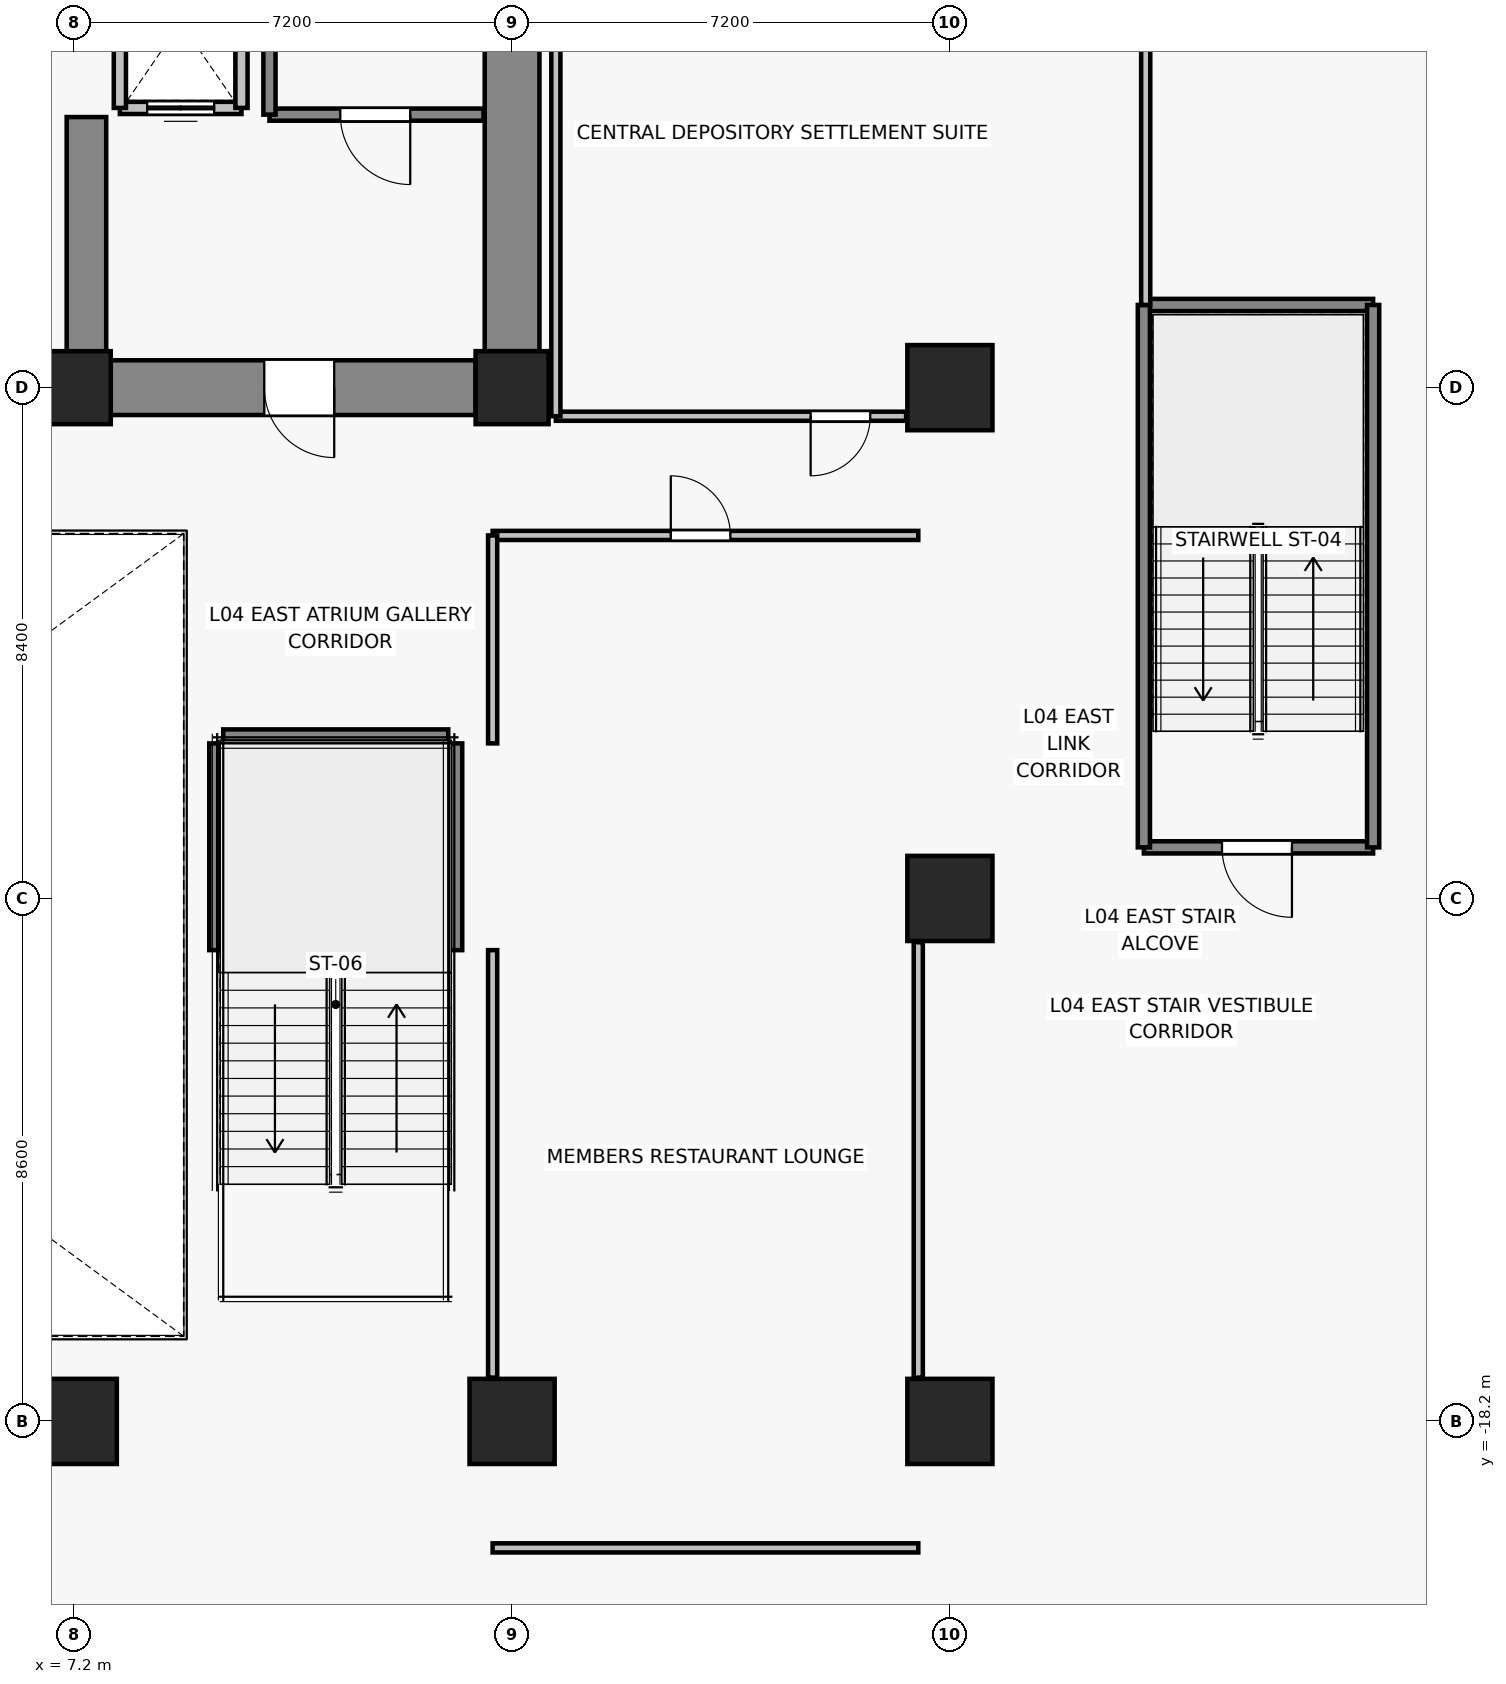
"""IFC4 building model, lengths in metres.
Left out: names, types, materials, properties, quantities, classifications, styles, units other than length and angle.
Written with IfcOpenShell. Run it as: python <this file> out.ifc"""

import sys

from ifc_helpers import new_model, si_unit, direction, frame, frame_2d, origin, origin_2d, place, context, subcontext, project, spatial, rectangle, extrude, source, transform, mapped, element, fill, save


model = new_model("IFC4")
c1 = context("Model", 3, precision=1e-05, world=origin(), true_north=direction((0.0, 1.0)))
c2 = subcontext(c1, "Body", "Model", "MODEL_VIEW")
j1 = project(units=[si_unit("LENGTHUNIT", "METRE"), si_unit("PLANEANGLEUNIT", "RADIAN")], contexts=[c1])
p1 = place(None, origin())
s1 = spatial("IfcSite", under=j1, at=p1, CompositionType="ELEMENT")
p2 = place(p1, origin())
s2 = spatial("IfcBuilding", under=s1, at=p2, CompositionType="ELEMENT")
p3 = place(p2, frame((0.0, 0.0, 18.2)))
s3 = spatial("IfcBuildingStorey", under=s2, at=p3, CompositionType="ELEMENT", Elevation=18.2)
for number, where, z_axis, x_axis in (
    (1, (7.2, -1.2, 0.0), (0.0, 0.0, 1.0), (1.0, 0.0, 0.0)),
    (2, (14.4, -1.2, 0.0), (0.0, 0.0, 1.0), (1.0, 0.0, 0.0)),
):
    element("IfcColumn", number, at=place(p3, frame(where, z_axis=z_axis, x_axis=x_axis)), inside=s3, PredefinedType="COLUMN", context=c2, shape_type="SweptSolid", body=[
        extrude(rectangle(XDim=1.2, YDim=1.2, at=origin_2d()), origin(), (0.0, 0.0, 1.0), 4.4),
    ])
for number, where, z_axis, x_axis in (
    (3, (7.2, -18.2, 0.0), (0.0, 0.0, 1.0), (1.0, 0.0, 0.0)),
    (4, (14.4, -18.2, 0.0), (0.0, 0.0, 1.0), (1.0, 0.0, 0.0)),
    (5, (21.6, -18.2, 0.0), (0.0, 0.0, 1.0), (1.0, 0.0, 0.0)),
    (6, (21.6, -9.6, 0.0), (0.0, 0.0, 1.0), (1.0, 0.0, 0.0)),
    (7, (21.6, -1.2, 0.0), (0.0, 0.0, 1.0), (1.0, 0.0, 0.0)),
):
    element("IfcColumn", number, at=place(p3, frame(where, z_axis=z_axis, x_axis=x_axis)), inside=s3, PredefinedType="COLUMN", context=c2, shape_type="SweptSolid", body=[
        extrude(rectangle(XDim=1.4, YDim=1.4, at=origin_2d()), origin(), (0.0, 0.0, 1.0), 4.4),
    ])
p4 = place(p3, frame((14.4, -0.6, 0.0), z_axis=(0.0, 0.0, 1.0), x_axis=(0.0, 1.0, 0.0)))
e8 = element("IfcWall", 8, at=p4, inside=s3, PredefinedType="SHEAR", context=c2, shape_type="SweptSolid", body=[
    extrude(rectangle(XDim=6.6, YDim=0.9, at=frame_2d((3.3, 0.0))), origin(), (0.0, 0.0, 1.0), 4.1),
])
p5 = place(p3, frame((13.8, -1.2, 0.0), z_axis=(0.0, 0.0, 1.0), x_axis=(-1.0, 0.0, 0.0)))
e9 = element("IfcWall", 9, at=p5, inside=s3, PredefinedType="SHEAR", context=c2, shape_type="SweptSolid", body=[
    extrude(rectangle(XDim=6.0, YDim=0.9, at=frame_2d((3.0, 0.0))), origin(), (0.0, 0.0, 1.0), 4.1),
])
p6 = place(p5, frame((2.325, 0.0, 0.0)))
e10 = element("IfcOpeningElement", 10, at=p6, cuts=e9, PredefinedType="OPENING", context=c2, shape_type="SweptSolid", body=[
    extrude(rectangle(XDim=1.15, YDim=2.15, at=frame_2d((0.575, 1.075))), frame((0.0, 0.46, 0.0), z_axis=(0.0, -1.0, 0.0), x_axis=(1.0, 0.0, 0.0)), (0.0, 0.0, 1.0), 0.92),
])
p7 = place(p3, frame((7.4, -0.75, 0.0), z_axis=(0.0, 0.0, 1.0), x_axis=(0.0, 1.0, 0.0)))
e11 = element("IfcWall", 11, at=p7, inside=s3, PredefinedType="SHEAR", context=c2, shape_type="SweptSolid", body=[
    extrude(rectangle(XDim=4.0, YDim=0.65, at=frame_2d((2.0, 0.0))), origin(), (0.0, 0.0, 1.0), 4.1),
])
for number, where, z_axis, x_axis in (
    (12, (9.52, -10.45, 0.0), (0.0, 0.0, 1.0), (0.0, 1.0, 0.0)),
    (13, (13.48, -7.05, 0.0), (0.0, 0.0, 1.0), (0.0, -1.0, 0.0)),
):
    element("IfcWall", number, at=place(p3, frame(where, z_axis=z_axis, x_axis=x_axis)), inside=s3, PredefinedType="SOLIDWALL", context=c2, shape_type="SweptSolid", body=[
        extrude(rectangle(XDim=3.4, YDim=0.2, at=frame_2d((1.7, 0.0))), origin(), (0.0, 0.0, 1.0), 4.1),
    ])
p8 = place(p3, frame((9.65, -6.92, 0.0), z_axis=(0.0, 0.0, 1.0), x_axis=(1.0, 0.0, 0.0)))
e14 = element("IfcWall", 14, at=p8, inside=s3, PredefinedType="SOLIDWALL", context=c2, shape_type="SweptSolid", body=[
    extrude(rectangle(XDim=3.7, YDim=0.2, at=frame_2d((1.85, 0.0))), origin(), (0.0, 0.0, 1.0), 4.1),
])
p9 = place(p3, frame((9.95, 3.4, 0.0), z_axis=(0.0, 0.0, 1.0), x_axis=(-1.0, 0.0, 0.0)))
e15 = element("IfcWall", 15, at=p9, inside=s3, PredefinedType="SOLIDWALL", context=c2, shape_type="SweptSolid", body=[
    extrude(rectangle(XDim=2.0, YDim=0.2, at=frame_2d((1.0, 0.0))), origin(), (0.0, 0.0, 1.0), 4.1),
])
p10 = place(p9, frame((0.45, 0.0, 0.0)))
e16 = element("IfcOpeningElement", 16, at=p10, cuts=e15, PredefinedType="OPENING", context=c2, shape_type="SweptSolid", body=[
    extrude(rectangle(XDim=1.1, YDim=2.2, at=frame_2d((0.55, 1.1))), frame((0.0, 0.11, 0.0), z_axis=(0.0, -1.0, 0.0), x_axis=(1.0, 0.0, 0.0)), (0.0, 0.0, 1.0), 0.22),
])
for number, where, z_axis, x_axis in (
    (17, (7.95, 3.4, 0.0), (0.0, 0.0, 1.0), (0.0, 1.0, 0.0)),
    (18, (9.95, 6.2, 0.0), (0.0, 0.0, 1.0), (0.0, -1.0, 0.0)),
):
    element("IfcWall", number, at=place(p3, frame(where, z_axis=z_axis, x_axis=x_axis)), inside=s3, PredefinedType="SOLIDWALL", context=c2, shape_type="SweptSolid", body=[
        extrude(rectangle(XDim=2.8, YDim=0.2, at=frame_2d((1.4, 0.0))), origin(), (0.0, 0.0, 1.0), 4.1),
    ])
p11 = place(p3, frame((13.93, 3.29, 0.0), z_axis=(0.0, 0.0, 1.0), x_axis=(-1.0, 0.0, 0.0)))
e19 = element("IfcWall", 19, at=p11, inside=s3, PredefinedType="SOLIDWALL", context=c2, shape_type="SweptSolid", body=[
    extrude(rectangle(XDim=3.52, YDim=0.2, at=frame_2d((1.76, 0.0))), origin(), (0.0, 0.0, 1.0), 4.1),
])
p12 = place(p11, frame((1.205, 0.0, 0.0)))
e20 = element("IfcOpeningElement", 20, at=p12, cuts=e19, PredefinedType="OPENING", context=c2, shape_type="SweptSolid", body=[
    extrude(rectangle(XDim=1.15, YDim=2.15, at=frame_2d((0.575, 1.075))), frame((0.0, 0.11, 0.0), z_axis=(0.0, -1.0, 0.0), x_axis=(1.0, 0.0, 0.0)), (0.0, 0.0, 1.0), 0.22),
])
p13 = place(p3, frame((10.41, 3.29, 0.0), z_axis=(0.0, 0.0, 1.0), x_axis=(0.0, 1.0, 0.0)))
e21 = element("IfcWall", 21, at=p13, inside=s3, PredefinedType="SOLIDWALL", context=c2, shape_type="SweptSolid", body=[
    extrude(rectangle(XDim=8.84, YDim=0.2, at=frame_2d((4.42, 0.0))), origin(), (0.0, 0.0, 1.0), 4.1),
])
p14 = place(p3, frame((28.56, -8.76, 0.0), z_axis=(0.0, 0.0, 1.0), x_axis=(-1.0, 0.0, 0.0)))
e22 = element("IfcWall", 22, at=p14, inside=s3, PredefinedType="SOLIDWALL", context=c2, shape_type="SweptSolid", body=[
    extrude(rectangle(XDim=3.77, YDim=0.2, at=frame_2d((1.885, 0.0))), origin(), (0.0, 0.0, 1.0), 4.1),
])
p15 = place(p14, frame((1.335, 0.0, 0.0)))
e23 = element("IfcOpeningElement", 23, at=p15, cuts=e22, PredefinedType="OPENING", context=c2, shape_type="SweptSolid", body=[
    extrude(rectangle(XDim=1.15, YDim=2.15, at=frame_2d((0.575, 1.075))), frame((0.0, 0.11, 0.0), z_axis=(0.0, -1.0, 0.0), x_axis=(1.0, 0.0, 0.0)), (0.0, 0.0, 1.0), 0.22),
])
p16 = place(p3, frame((24.79, 0.16, 0.0), z_axis=(0.0, 0.0, 1.0), x_axis=(1.0, 0.0, 0.0)))
e24 = element("IfcWall", 24, at=p16, inside=s3, PredefinedType="SOLIDWALL", context=c2, shape_type="SweptSolid", body=[
    extrude(rectangle(XDim=3.77, YDim=0.2, at=frame_2d((1.885, 0.0))), origin(), (0.0, 0.0, 1.0), 4.1),
])
for number, where, z_axis, x_axis in (
    (25, (24.79, -8.76, 0.0), (0.0, 0.0, 1.0), (0.0, 1.0, 0.0)),
    (26, (28.56, 0.16, 0.0), (0.0, 0.0, 1.0), (0.0, -1.0, 0.0)),
):
    element("IfcWall", number, at=place(p3, frame(where, z_axis=z_axis, x_axis=x_axis)), inside=s3, PredefinedType="SOLIDWALL", context=c2, shape_type="SweptSolid", body=[
        extrude(rectangle(XDim=8.92, YDim=0.2, at=frame_2d((4.46, 0.0))), origin(), (0.0, 0.0, 1.0), 4.1),
    ])
p17 = place(p3, frame((21.08, -20.28, 0.0), z_axis=(0.0, 0.0, 1.0), x_axis=(-1.0, 0.0, 0.0)))
e27 = element("IfcWall", 27, at=p17, inside=s3, PredefinedType="PARTITIONING", context=c2, shape_type="SweptSolid", body=[
    extrude(rectangle(XDim=7.0, YDim=0.15, at=frame_2d((3.5, 0.0))), origin(), (0.0, 0.0, 1.0), 4.1),
])
p18 = place(p3, frame((14.08, -3.63, 0.0), z_axis=(0.0, 0.0, 1.0), x_axis=(1.0, 0.0, 0.0)))
e28 = element("IfcWall", 28, at=p18, inside=s3, PredefinedType="PARTITIONING", context=c2, shape_type="SweptSolid", body=[
    extrude(rectangle(XDim=7.0, YDim=0.15, at=frame_2d((3.5, 0.0))), origin(), (0.0, 0.0, 1.0), 3.239),
])
p19 = place(p18, frame((2.93, 0.0, 0.0)))
e29 = element("IfcOpeningElement", 29, at=p19, cuts=e28, PredefinedType="OPENING", context=c2, shape_type="SweptSolid", body=[
    extrude(rectangle(XDim=0.98, YDim=2.15, at=frame_2d((0.49, 1.075))), frame((0.0, 0.085, 0.0), z_axis=(0.0, -1.0, 0.0), x_axis=(1.0, 0.0, 0.0)), (0.0, 0.0, 1.0), 0.17),
])
p20 = place(p3, frame((14.08, -17.48, 0.0), z_axis=(0.0, 0.0, 1.0), x_axis=(0.0, 1.0, 0.0)))
e30 = element("IfcWall", 30, at=p20, inside=s3, PredefinedType="PARTITIONING", context=c2, shape_type="SweptSolid", body=[
    extrude(rectangle(XDim=7.03, YDim=0.15, at=frame_2d((3.515, 0.0))), origin(), (0.0, 0.0, 1.0), 3.29),
])
p21 = place(p3, frame((14.08, -7.05, 0.0), z_axis=(0.0, 0.0, 1.0), x_axis=(0.0, 1.0, 0.0)))
e31 = element("IfcWall", 31, at=p21, inside=s3, PredefinedType="PARTITIONING", context=c2, shape_type="SweptSolid", body=[
    extrude(rectangle(XDim=3.42, YDim=0.15, at=frame_2d((1.71, 0.0))), origin(), (0.0, 0.0, 1.0), 3.29),
])
p22 = place(p3, frame((21.08, -10.32, 0.0), z_axis=(0.0, 0.0, 1.0), x_axis=(0.0, -1.0, 0.0)))
e32 = element("IfcWall", 32, at=p22, inside=s3, PredefinedType="PARTITIONING", context=c2, shape_type="SweptSolid", body=[
    extrude(rectangle(XDim=7.16, YDim=0.15, at=frame_2d((3.58, 0.0))), origin(), (0.0, 0.0, 1.0), 3.29),
])
p23 = place(p3, frame((20.88, -1.67, 0.0), z_axis=(0.0, 0.0, 1.0), x_axis=(-1.0, 0.0, 0.0)))
e33 = element("IfcWall", 33, at=p23, inside=s3, PredefinedType="PARTITIONING", context=c2, shape_type="SweptSolid", body=[
    extrude(rectangle(XDim=5.76, YDim=0.15, at=frame_2d((2.88, 0.0))), origin(), (0.0, 0.0, 1.0), 4.1),
])
p24 = place(p23, frame((0.59, 0.0, 0.0)))
e34 = element("IfcOpeningElement", 34, at=p24, cuts=e33, PredefinedType="OPENING", context=c2, shape_type="SweptSolid", body=[
    extrude(rectangle(XDim=0.98, YDim=2.15, at=frame_2d((0.49, 1.075))), frame((0.0, 0.085, 0.0), z_axis=(0.0, -1.0, 0.0), x_axis=(1.0, 0.0, 0.0)), (0.0, 0.0, 1.0), 0.17),
])
p25 = place(p3, frame((15.12, -1.67, 0.0), z_axis=(0.0, 0.0, 1.0), x_axis=(0.0, 1.0, 0.0)))
e35 = element("IfcWall", 35, at=p25, inside=s3, PredefinedType="PARTITIONING", context=c2, shape_type="SweptSolid", body=[
    extrude(rectangle(XDim=15.15, YDim=0.15, at=frame_2d((7.575, 0.0))), origin(), (0.0, 0.0, 1.0), 3.19),
])
p26 = place(p3, frame((24.82, 13.48, 0.0), z_axis=(0.0, 0.0, 1.0), x_axis=(0.0, -1.0, 0.0)))
e36 = element("IfcWall", 36, at=p26, inside=s3, PredefinedType="PARTITIONING", context=c2, shape_type="SweptSolid", body=[
    extrude(rectangle(XDim=13.32, YDim=0.15, at=frame_2d((6.66, 0.0))), origin(), (0.0, 0.0, 1.0), 3.19),
])
m1 = source(origin(), c2, "Body", "SweptSolid", [
    extrude(rectangle(XDim=1.1, YDim=2.2, at=frame_2d((0.55, 1.1))), frame((0.0, 0.025, 0.0), z_axis=(0.0, -1.0, 0.0), x_axis=(1.0, 0.0, 0.0)), (0.0, 0.0, 1.0), 0.05),
])
p27 = place(p10, origin())
e37 = element("IfcDoor", 37, at=p27, inside=s3, OperationType="DOUBLE_DOOR_SLIDING", PredefinedType="DOOR", context=c2, shape_type="MappedRepresentation", body=[
    mapped(m1, transform((0.0, 0.0, 0.0), x_axis=(1.0, 0.0, 0.0), y_axis=(0.0, 1.0, 0.0), z_axis=(0.0, 0.0, 1.0), scale=1.0)),
])
fill(e16, e37)
m2 = source(origin(), c2, "Body", "SweptSolid", [
    extrude(rectangle(XDim=1.15, YDim=2.15, at=frame_2d((0.575, 1.075))), frame((0.0, 0.025, 0.0), z_axis=(0.0, -1.0, 0.0), x_axis=(1.0, 0.0, 0.0)), (0.0, 0.0, 1.0), 0.05),
])
p28 = place(p12, origin())
e38 = element("IfcDoor", 38, at=p28, inside=s3, OperationType="SINGLE_SWING_LEFT", PredefinedType="DOOR", context=c2, shape_type="MappedRepresentation", body=[
    mapped(m2, transform((0.0, 0.0, 0.0), x_axis=(1.0, 0.0, 0.0), y_axis=(0.0, 1.0, 0.0), z_axis=(0.0, 0.0, 1.0), scale=1.0)),
])
fill(e20, e38)
p29 = place(p6, origin())
e39 = element("IfcDoor", 39, at=p29, inside=s3, OperationType="SINGLE_SWING_LEFT", PredefinedType="DOOR", context=c2, shape_type="MappedRepresentation", body=[
    mapped(m2, transform((0.0, 0.0, 0.0), x_axis=(1.0, 0.0, 0.0), y_axis=(0.0, 1.0, 0.0), z_axis=(0.0, 0.0, 1.0), scale=1.0)),
])
fill(e10, e39)
p30 = place(p15, origin())
e40 = element("IfcDoor", 40, at=p30, inside=s3, OperationType="SINGLE_SWING_LEFT", PredefinedType="DOOR", context=c2, shape_type="MappedRepresentation", body=[
    mapped(m2, transform((0.0, 0.0, 0.0), x_axis=(1.0, 0.0, 0.0), y_axis=(0.0, 1.0, 0.0), z_axis=(0.0, 0.0, 1.0), scale=1.0)),
])
fill(e23, e40)
m3 = source(origin(), c2, "Body", "SweptSolid", [
    extrude(rectangle(XDim=0.98, YDim=2.15, at=frame_2d((0.49, 1.075))), frame((0.0, 0.025, 0.0), z_axis=(0.0, -1.0, 0.0), x_axis=(1.0, 0.0, 0.0)), (0.0, 0.0, 1.0), 0.05),
])
p31 = place(p19, origin())
e41 = element("IfcDoor", 41, at=p31, inside=s3, OperationType="SINGLE_SWING_LEFT", PredefinedType="DOOR", context=c2, shape_type="MappedRepresentation", body=[
    mapped(m3, transform((0.0, 0.0, 0.0), x_axis=(1.0, 0.0, 0.0), y_axis=(0.0, 1.0, 0.0), z_axis=(0.0, 0.0, 1.0), scale=1.0)),
])
fill(e29, e41)
p32 = place(p24, origin())
e42 = element("IfcDoor", 42, at=p32, inside=s3, OperationType="SINGLE_SWING_RIGHT", PredefinedType="DOOR", context=c2, shape_type="MappedRepresentation", body=[
    mapped(m3, transform((0.0, 0.0, 0.0), x_axis=(1.0, 0.0, 0.0), y_axis=(0.0, 1.0, 0.0), z_axis=(0.0, 0.0, 1.0), scale=1.0)),
])
fill(e34, e42)
save(model, sys.argv[1])
